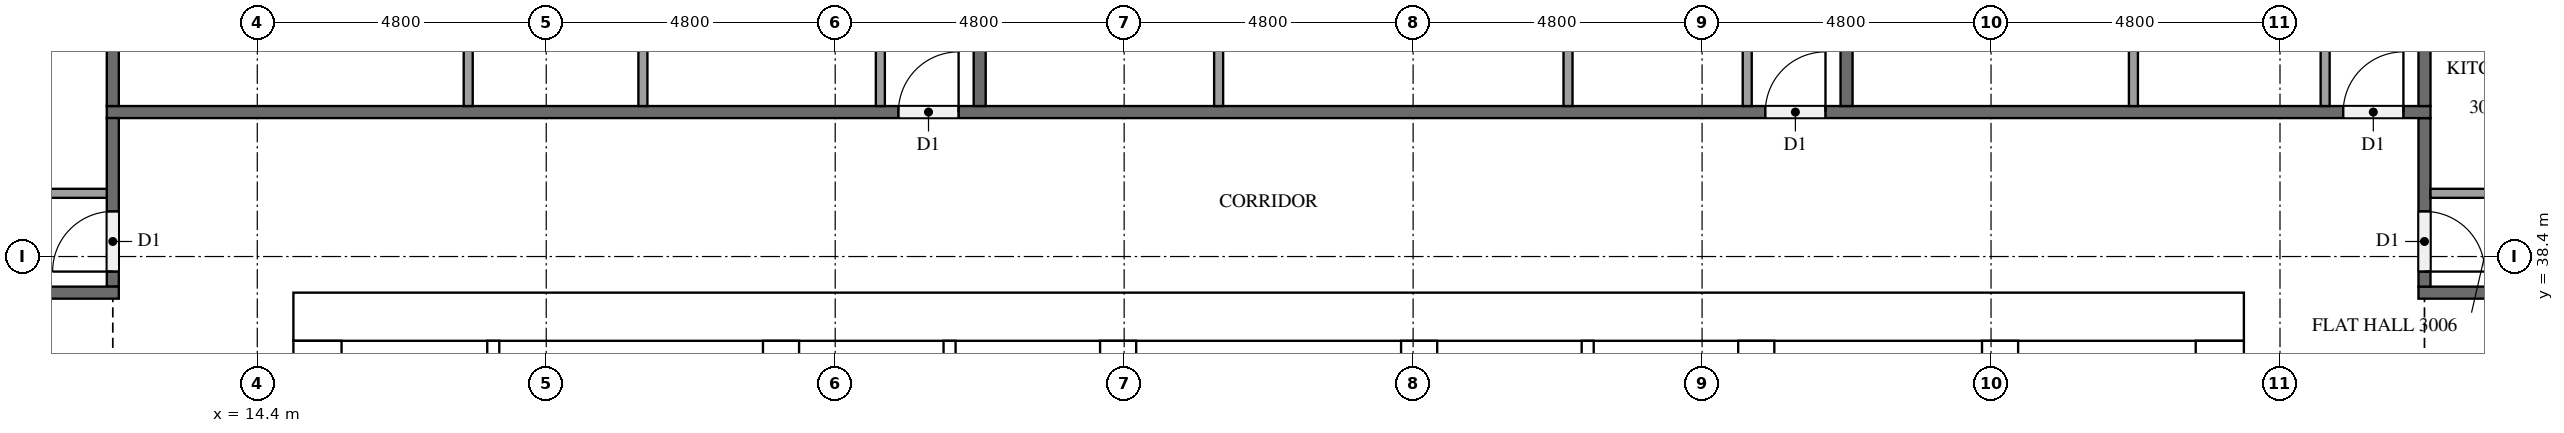
"""IFC4 building model, lengths in metres.
Left out: names, types, materials, properties, quantities, classifications, styles, units other than length and angle.
Written with IfcOpenShell. Run it as: python <this file> out.ifc"""

import sys

from ifc_helpers import new_model, si_unit, direction, frame, frame_2d, origin, place, context, subcontext, project, spatial, rectangle, extrude, element, fill, save


model = new_model("IFC4")
c1 = context("Model", 3, precision=1e-05, world=origin(), true_north=direction((0.0, 1.0)))
c2 = subcontext(c1, "Body", "Model", "MODEL_VIEW")
j1 = project(units=[si_unit("LENGTHUNIT", "METRE"), si_unit("PLANEANGLEUNIT", "RADIAN")], contexts=[c1])
p1 = place(None, origin())
s1 = spatial("IfcSite", under=j1, at=p1, CompositionType="ELEMENT")
p2 = place(p1, origin())
s2 = spatial("IfcBuilding", under=s1, at=p2, CompositionType="ELEMENT")
p3 = place(p2, frame((0.0, 0.0, 119.1)))
s3 = spatial("IfcBuildingStorey", under=s2, at=p3, CompositionType="ELEMENT", Elevation=119.1)
p4 = place(p3, frame((15.0, 37.4, 0.0), z_axis=(0.0, 0.0, 1.0), x_axis=(1.0, 0.0, 0.0)))
e1 = element("IfcWall", 1, at=p4, inside=s3, PredefinedType="SHEAR", context=c2, shape_type="SweptSolid", body=[
    extrude(rectangle(XDim=32.4, YDim=0.8, at=frame_2d((16.2, 0.0))), origin(), (0.0, 0.0, 1.0), 3.2),
])
p5 = place(p4, frame((15.3, 0.0, 0.0)))
e2 = element("IfcOpeningElement", 2, at=p5, cuts=e1, PredefinedType="OPENING", context=c2, shape_type="SweptSolid", body=[
    extrude(rectangle(XDim=1.8, YDim=2.1, at=frame_2d((0.9, 1.05))), frame((0.0, 0.41, 0.0), z_axis=(0.0, -1.0, 0.0), x_axis=(1.0, 0.0, 0.0)), (0.0, 0.0, 1.0), 0.82),
])
p6 = place(p4, frame((1.51, 0.0, 0.0)))
e3 = element("IfcOpeningElement", 3, at=p6, cuts=e1, PredefinedType="OPENING", context=c2, shape_type="SweptSolid", body=[
    extrude(rectangle(XDim=1.0, YDim=2.1, at=frame_2d((0.5, 1.05))), frame((0.0, 0.41, 0.0), z_axis=(0.0, -1.0, 0.0), x_axis=(1.0, 0.0, 0.0)), (0.0, 0.0, 1.0), 0.82),
])
p7 = place(p4, frame((5.11, 0.0, 0.0)))
e4 = element("IfcOpeningElement", 4, at=p7, cuts=e1, PredefinedType="OPENING", context=c2, shape_type="SweptSolid", body=[
    extrude(rectangle(XDim=1.0, YDim=2.1, at=frame_2d((0.5, 1.05))), frame((0.0, 0.41, 0.0), z_axis=(0.0, -1.0, 0.0), x_axis=(1.0, 0.0, 0.0)), (0.0, 0.0, 1.0), 0.82),
])
p8 = place(p3, frame((15.4, 15.8, 0.0), z_axis=(0.0, 0.0, 1.0), x_axis=(0.0, 1.0, 0.0)))
e5 = element("IfcWall", 5, at=p8, inside=s3, PredefinedType="SHEAR", context=c2, shape_type="SweptSolid", body=[
    extrude(rectangle(XDim=21.2, YDim=0.8, at=frame_2d((10.6, 0.0))), origin(), (0.0, 0.0, 1.0), 3.2),
])
p9 = place(p8, frame((4.96, 0.0, 0.0)))
e6 = element("IfcOpeningElement", 6, at=p9, cuts=e5, PredefinedType="OPENING", context=c2, shape_type="SweptSolid", body=[
    extrude(rectangle(XDim=1.2, YDim=2.1, at=frame_2d((0.6, 1.05))), frame((0.0, 0.41, 0.0), z_axis=(0.0, -1.0, 0.0), x_axis=(1.0, 0.0, 0.0)), (0.0, 0.0, 1.0), 0.82),
])
p10 = place(p3, frame((47.0, 15.8, 0.0), z_axis=(0.0, 0.0, 1.0), x_axis=(0.0, 1.0, 0.0)))
e7 = element("IfcWall", 7, at=p10, inside=s3, PredefinedType="SHEAR", context=c2, shape_type="SweptSolid", body=[
    extrude(rectangle(XDim=21.2, YDim=0.8, at=frame_2d((10.6, 0.0))), origin(), (0.0, 0.0, 1.0), 3.2),
])
p11 = place(p10, frame((10.3, 0.0, 0.0)))
e8 = element("IfcOpeningElement", 8, at=p11, cuts=e7, PredefinedType="OPENING", context=c2, shape_type="SweptSolid", body=[
    extrude(rectangle(XDim=1.2, YDim=2.1, at=frame_2d((0.6, 1.05))), frame((0.0, 0.41, 0.0), z_axis=(0.0, -1.0, 0.0), x_axis=(1.0, 0.0, 0.0)), (0.0, 0.0, 1.0), 0.82),
])
p12 = place(p3, frame((23.1, 15.8, 0.0), z_axis=(0.0, 0.0, 1.0), x_axis=(0.0, 1.0, 0.0)))
e9 = element("IfcWall", 9, at=p12, inside=s3, PredefinedType="SHEAR", context=c2, shape_type="SweptSolid", body=[
    extrude(rectangle(XDim=21.2, YDim=0.6, at=frame_2d((10.6, 0.0))), origin(), (0.0, 0.0, 1.0), 3.2),
])
p13 = place(p3, frame((39.3, 27.75, 0.0), z_axis=(0.0, 0.0, 1.0), x_axis=(0.0, 1.0, 0.0)))
e10 = element("IfcWall", 10, at=p13, inside=s3, PredefinedType="SHEAR", context=c2, shape_type="SweptSolid", body=[
    extrude(rectangle(XDim=9.25, YDim=0.6, at=frame_2d((4.625, 0.0))), origin(), (0.0, 0.0, 1.0), 3.2),
])
p14 = place(p3, frame((43.35, 27.75, 0.0), z_axis=(0.0, 0.0, 1.0), x_axis=(0.0, 1.0, 0.0)))
e11 = element("IfcWall", 11, at=p14, inside=s3, PredefinedType="SHEAR", context=c2, shape_type="SweptSolid", body=[
    extrude(rectangle(XDim=9.25, YDim=0.6, at=frame_2d((4.625, 0.0))), origin(), (0.0, 0.0, 1.0), 3.2),
])
p15 = place(p14, frame((7.65, 0.0, 0.0)))
e12 = element("IfcOpeningElement", 12, at=p15, cuts=e11, PredefinedType="OPENING", context=c2, shape_type="SweptSolid", body=[
    extrude(rectangle(XDim=1.2, YDim=2.1, at=frame_2d((0.6, 1.05))), frame((0.0, 0.31, 0.0), z_axis=(0.0, -1.0, 0.0), x_axis=(1.0, 0.0, 0.0)), (0.0, 0.0, 1.0), 0.62),
])
for number, where, z_axis, x_axis in (
    (13, (28.7, 33.85, 0.0), (0.0, 0.0, 1.0), (0.0, 1.0, 0.0)),
    (14, (33.7, 33.85, 0.0), (0.0, 0.0, 1.0), (0.0, 1.0, 0.0)),
):
    element("IfcWall", number, at=place(p3, frame(where, z_axis=z_axis, x_axis=x_axis)), inside=s3, PredefinedType="SHEAR", context=c2, shape_type="SweptSolid", body=[
        extrude(rectangle(XDim=3.15, YDim=0.6, at=frame_2d((1.575, 0.0))), origin(), (0.0, 0.0, 1.0), 3.2),
    ])
for number, where, z_axis, x_axis in (
    (15, (25.9, 33.85, 0.0), (0.0, 0.0, 1.0), (0.0, 1.0, 0.0)),
    (16, (36.5, 33.85, 0.0), (0.0, 0.0, 1.0), (0.0, 1.0, 0.0)),
):
    element("IfcWall", number, at=place(p3, frame(where, z_axis=z_axis, x_axis=x_axis)), inside=s3, PredefinedType="SOLIDWALL", context=c2, shape_type="SweptSolid", body=[
        extrude(rectangle(XDim=3.15, YDim=0.2, at=frame_2d((1.575, 0.0))), origin(), (0.0, 0.0, 1.0), 3.2),
    ])
p16 = place(p3, frame((18.32, 31.55, 0.0), z_axis=(0.0, 0.0, 1.0), x_axis=(0.0, 1.0, 0.0)))
e17 = element("IfcWall", 17, at=p16, inside=s3, PredefinedType="PARTITIONING", context=c2, shape_type="SweptSolid", body=[
    extrude(rectangle(XDim=5.45, YDim=0.2, at=frame_2d((2.725, 0.0))), origin(), (0.0, 0.0, 1.0), 3.2),
])
p17 = place(p3, frame((52.5, 37.8, 0.0), z_axis=(0.0, 0.0, 1.0), x_axis=(-1.0, 0.0, 0.0)))
e18 = element("IfcWall", 18, at=p17, inside=s3, PredefinedType="PARTITIONING", context=c2, shape_type="SweptSolid", body=[
    extrude(rectangle(XDim=2.2, YDim=0.2, at=frame_2d((1.1, 0.0))), origin(), (0.0, 0.0, 1.0), 3.2),
])
p18 = place(p3, frame((50.4, 40.7, 0.0), z_axis=(0.0, 0.0, 1.0), x_axis=(0.0, -1.0, 0.0)))
e19 = element("IfcWall", 19, at=p18, inside=s3, PredefinedType="PARTITIONING", context=c2, shape_type="SweptSolid", body=[
    extrude(rectangle(XDim=2.8, YDim=0.2, at=frame_2d((1.4, 0.0))), origin(), (0.0, 0.0, 1.0), 3.2),
])
p19 = place(p18, frame((1.55, 0.0, 0.0)))
e20 = element("IfcOpeningElement", 20, at=p19, cuts=e19, PredefinedType="OPENING", context=c2, shape_type="SweptSolid", body=[
    extrude(rectangle(XDim=1.0, YDim=2.1, at=frame_2d((0.5, 1.05))), frame((0.0, 0.11, 0.0), z_axis=(0.0, -1.0, 0.0), x_axis=(1.0, 0.0, 0.0)), (0.0, 0.0, 1.0), 0.22),
])
p20 = place(p3, frame((11.9, 40.8, 0.0), z_axis=(0.0, 0.0, 1.0), x_axis=(1.0, 0.0, 0.0)))
e21 = element("IfcWall", 21, at=p20, inside=s3, PredefinedType="PARTITIONING", context=c2, shape_type="SweptSolid", body=[
    extrude(rectangle(XDim=38.6, YDim=0.2, at=frame_2d((19.3, 0.0))), origin(), (0.0, 0.0, 1.0), 3.2),
])
p21 = place(p20, frame((37.15, 0.0, 0.0)))
e22 = element("IfcOpeningElement", 22, at=p21, cuts=e21, PredefinedType="OPENING", context=c2, shape_type="SweptSolid", body=[
    extrude(rectangle(XDim=1.0, YDim=2.1, at=frame_2d((0.5, 1.05))), frame((0.0, 0.11, 0.0), z_axis=(0.0, -1.0, 0.0), x_axis=(1.0, 0.0, 0.0)), (0.0, 0.0, 1.0), 0.22),
])
p22 = place(p20, frame((27.55, 0.0, 0.0)))
e23 = element("IfcOpeningElement", 23, at=p22, cuts=e21, PredefinedType="OPENING", context=c2, shape_type="SweptSolid", body=[
    extrude(rectangle(XDim=1.0, YDim=2.1, at=frame_2d((0.5, 1.05))), frame((0.0, 0.11, 0.0), z_axis=(0.0, -1.0, 0.0), x_axis=(1.0, 0.0, 0.0)), (0.0, 0.0, 1.0), 0.22),
])
p23 = place(p20, frame((13.15, 0.0, 0.0)))
e24 = element("IfcOpeningElement", 24, at=p23, cuts=e21, PredefinedType="OPENING", context=c2, shape_type="SweptSolid", body=[
    extrude(rectangle(XDim=1.0, YDim=2.1, at=frame_2d((0.5, 1.05))), frame((0.0, 0.11, 0.0), z_axis=(0.0, -1.0, 0.0), x_axis=(1.0, 0.0, 0.0)), (0.0, 0.0, 1.0), 0.22),
])
p24 = place(p3, frame((12.0, 37.9, 0.0), z_axis=(0.0, 0.0, 1.0), x_axis=(0.0, 1.0, 0.0)))
e25 = element("IfcWall", 25, at=p24, inside=s3, PredefinedType="PARTITIONING", context=c2, shape_type="SweptSolid", body=[
    extrude(rectangle(XDim=2.8, YDim=0.2, at=frame_2d((1.4, 0.0))), origin(), (0.0, 0.0, 1.0), 3.2),
])
p25 = place(p24, frame((0.25, 0.0, 0.0)))
e26 = element("IfcOpeningElement", 26, at=p25, cuts=e25, PredefinedType="OPENING", context=c2, shape_type="SweptSolid", body=[
    extrude(rectangle(XDim=1.0, YDim=2.1, at=frame_2d((0.5, 1.05))), frame((0.0, 0.11, 0.0), z_axis=(0.0, -1.0, 0.0), x_axis=(1.0, 0.0, 0.0)), (0.0, 0.0, 1.0), 0.22),
])
p26 = place(p3, frame((12.1, 37.8, 0.0), z_axis=(0.0, 0.0, 1.0), x_axis=(-1.0, 0.0, 0.0)))
e27 = element("IfcWall", 27, at=p26, inside=s3, PredefinedType="PARTITIONING", context=c2, shape_type="SweptSolid", body=[
    extrude(rectangle(XDim=2.2, YDim=0.2, at=frame_2d((1.1, 0.0))), origin(), (0.0, 0.0, 1.0), 3.2),
])
for number, where, z_axis, x_axis in (
    (28, (50.4, 40.9, 0.0), (0.0, 0.0, 1.0), (0.0, 1.0, 0.0)),
    (29, (40.8, 52.7, 0.0), (0.0, 0.0, 1.0), (0.0, -1.0, 0.0)),
    (30, (26.4, 52.7, 0.0), (0.0, 0.0, 1.0), (0.0, -1.0, 0.0)),
    (31, (12.0, 52.7, 0.0), (0.0, 0.0, 1.0), (0.0, -1.0, 0.0)),
):
    element("IfcWall", number, at=place(p3, frame(where, z_axis=z_axis, x_axis=x_axis)), inside=s3, PredefinedType="PARTITIONING", context=c2, shape_type="SweptSolid", body=[
        extrude(rectangle(XDim=11.8, YDim=0.2, at=frame_2d((5.9, 0.0))), origin(), (0.0, 0.0, 1.0), 3.2),
    ])
p27 = place(p3, frame((50.5, 39.45, 0.0), z_axis=(0.0, 0.0, 1.0), x_axis=(1.0, 0.0, 0.0)))
e32 = element("IfcWall", 32, at=p27, inside=s3, PredefinedType="PARTITIONING", context=c2, shape_type="SweptSolid", body=[
    extrude(rectangle(XDim=2.075, YDim=0.15, at=frame_2d((1.038, 0.0))), origin(), (0.0, 0.0, 1.0), 3.2),
])
p28 = place(p3, frame((45.565, 40.9, 0.0), z_axis=(0.0, 0.0, 1.0), x_axis=(0.0, 1.0, 0.0)))
e33 = element("IfcWall", 33, at=p28, inside=s3, PredefinedType="PARTITIONING", context=c2, shape_type="SweptSolid", body=[
    extrude(rectangle(XDim=3.725, YDim=0.15, at=frame_2d((1.863, 0.0))), origin(), (0.0, 0.0, 1.0), 3.2),
])
for number, where, z_axis, x_axis in (
    (34, (48.75, 40.9, 0.0), (0.0, 0.0, 1.0), (0.0, 1.0, 0.0)),
    (35, (36.173, 40.9, 0.0), (0.0, 0.0, 1.0), (0.0, 1.0, 0.0)),
    (36, (30.369, 40.9, 0.0), (0.0, 0.0, 1.0), (0.0, 1.0, 0.0)),
):
    element("IfcWall", number, at=place(p3, frame(where, z_axis=z_axis, x_axis=x_axis)), inside=s3, PredefinedType="PARTITIONING", context=c2, shape_type="SweptSolid", body=[
        extrude(rectangle(XDim=3.875, YDim=0.15, at=frame_2d((1.938, 0.0))), origin(), (0.0, 0.0, 1.0), 3.2),
    ])
p29 = place(p3, frame((39.15, 40.9, 0.0), z_axis=(0.0, 0.0, 1.0), x_axis=(0.0, 1.0, 0.0)))
e37 = element("IfcWall", 37, at=p29, inside=s3, PredefinedType="PARTITIONING", context=c2, shape_type="SweptSolid", body=[
    extrude(rectangle(XDim=4.025, YDim=0.15, at=frame_2d((2.013, 0.0))), origin(), (0.0, 0.0, 1.0), 3.2),
])
for number, where, z_axis, x_axis in (
    (38, (20.806, 40.9, 0.0), (0.0, 0.0, 1.0), (0.0, 1.0, 0.0)),
    (39, (17.904, 40.9, 0.0), (0.0, 0.0, 1.0), (0.0, 1.0, 0.0)),
):
    element("IfcWall", number, at=place(p3, frame(where, z_axis=z_axis, x_axis=x_axis)), inside=s3, PredefinedType="PARTITIONING", context=c2, shape_type="SweptSolid", body=[
        extrude(rectangle(XDim=4.475, YDim=0.15, at=frame_2d((2.238, 0.0))), origin(), (0.0, 0.0, 1.0), 3.2),
    ])
p30 = place(p3, frame((24.75, 40.9, 0.0), z_axis=(0.0, 0.0, 1.0), x_axis=(0.0, 1.0, 0.0)))
e40 = element("IfcWall", 40, at=p30, inside=s3, PredefinedType="PARTITIONING", context=c2, shape_type="SweptSolid", body=[
    extrude(rectangle(XDim=4.625, YDim=0.15, at=frame_2d((2.312, 0.0))), origin(), (0.0, 0.0, 1.0), 3.2),
])
p31 = place(p3, frame((11.9, 39.45, 0.0), z_axis=(0.0, 0.0, 1.0), x_axis=(-1.0, 0.0, 0.0)))
e41 = element("IfcWall", 41, at=p31, inside=s3, PredefinedType="PARTITIONING", context=c2, shape_type="SweptSolid", body=[
    extrude(rectangle(XDim=4.325, YDim=0.15, at=frame_2d((2.163, 0.0))), origin(), (0.0, 0.0, 1.0), 3.2),
])
p32 = place(p5, origin())
e42 = element("IfcDoor", 42, at=p32, inside=s3, OperationType="DOUBLE_DOOR_SINGLE_SWING", PredefinedType="DOOR", context=c2, shape_type="SweptSolid", body=[
    extrude(rectangle(XDim=1.8, YDim=2.1, at=frame_2d((0.9, 1.05))), frame((0.0, 0.025, 0.0), z_axis=(0.0, -1.0, 0.0), x_axis=(1.0, 0.0, 0.0)), (0.0, 0.0, 1.0), 0.05),
])
fill(e2, e42)
p33 = place(p6, origin())
e43 = element("IfcDoor", 43, at=p33, inside=s3, OperationType="SINGLE_SWING_LEFT", PredefinedType="DOOR", context=c2, shape_type="SweptSolid", body=[
    extrude(rectangle(XDim=1.0, YDim=2.1, at=frame_2d((0.5, 1.05))), frame((0.0, 0.025, 0.0), z_axis=(0.0, -1.0, 0.0), x_axis=(1.0, 0.0, 0.0)), (0.0, 0.0, 1.0), 0.05),
])
fill(e3, e43)
p34 = place(p7, origin())
e44 = element("IfcDoor", 44, at=p34, inside=s3, OperationType="SINGLE_SWING_RIGHT", PredefinedType="DOOR", context=c2, shape_type="SweptSolid", body=[
    extrude(rectangle(XDim=1.0, YDim=2.1, at=frame_2d((0.5, 1.05))), frame((0.0, 0.025, 0.0), z_axis=(0.0, -1.0, 0.0), x_axis=(1.0, 0.0, 0.0)), (0.0, 0.0, 1.0), 0.05),
])
fill(e4, e44)
p35 = place(p19, origin())
e45 = element("IfcDoor", 45, at=p35, inside=s3, OperationType="SINGLE_SWING_RIGHT", PredefinedType="DOOR", context=c2, shape_type="SweptSolid", body=[
    extrude(rectangle(XDim=1.0, YDim=2.1, at=frame_2d((0.5, 1.05))), frame((0.0, 0.025, 0.0), z_axis=(0.0, -1.0, 0.0), x_axis=(1.0, 0.0, 0.0)), (0.0, 0.0, 1.0), 0.05),
])
fill(e20, e45)
p36 = place(p21, origin())
e46 = element("IfcDoor", 46, at=p36, inside=s3, OperationType="SINGLE_SWING_RIGHT", PredefinedType="DOOR", context=c2, shape_type="SweptSolid", body=[
    extrude(rectangle(XDim=1.0, YDim=2.1, at=frame_2d((0.5, 1.05))), frame((0.0, 0.025, 0.0), z_axis=(0.0, -1.0, 0.0), x_axis=(1.0, 0.0, 0.0)), (0.0, 0.0, 1.0), 0.05),
])
fill(e22, e46)
p37 = place(p22, origin())
e47 = element("IfcDoor", 47, at=p37, inside=s3, OperationType="SINGLE_SWING_RIGHT", PredefinedType="DOOR", context=c2, shape_type="SweptSolid", body=[
    extrude(rectangle(XDim=1.0, YDim=2.1, at=frame_2d((0.5, 1.05))), frame((0.0, 0.025, 0.0), z_axis=(0.0, -1.0, 0.0), x_axis=(1.0, 0.0, 0.0)), (0.0, 0.0, 1.0), 0.05),
])
fill(e23, e47)
p38 = place(p23, origin())
e48 = element("IfcDoor", 48, at=p38, inside=s3, OperationType="SINGLE_SWING_RIGHT", PredefinedType="DOOR", context=c2, shape_type="SweptSolid", body=[
    extrude(rectangle(XDim=1.0, YDim=2.1, at=frame_2d((0.5, 1.05))), frame((0.0, 0.025, 0.0), z_axis=(0.0, -1.0, 0.0), x_axis=(1.0, 0.0, 0.0)), (0.0, 0.0, 1.0), 0.05),
])
fill(e24, e48)
p39 = place(p25, origin())
e49 = element("IfcDoor", 49, at=p39, inside=s3, OperationType="SINGLE_SWING_LEFT", PredefinedType="DOOR", context=c2, shape_type="SweptSolid", body=[
    extrude(rectangle(XDim=1.0, YDim=2.1, at=frame_2d((0.5, 1.05))), frame((0.0, 0.025, 0.0), z_axis=(0.0, -1.0, 0.0), x_axis=(1.0, 0.0, 0.0)), (0.0, 0.0, 1.0), 0.05),
])
fill(e26, e49)
save(model, sys.argv[1])
